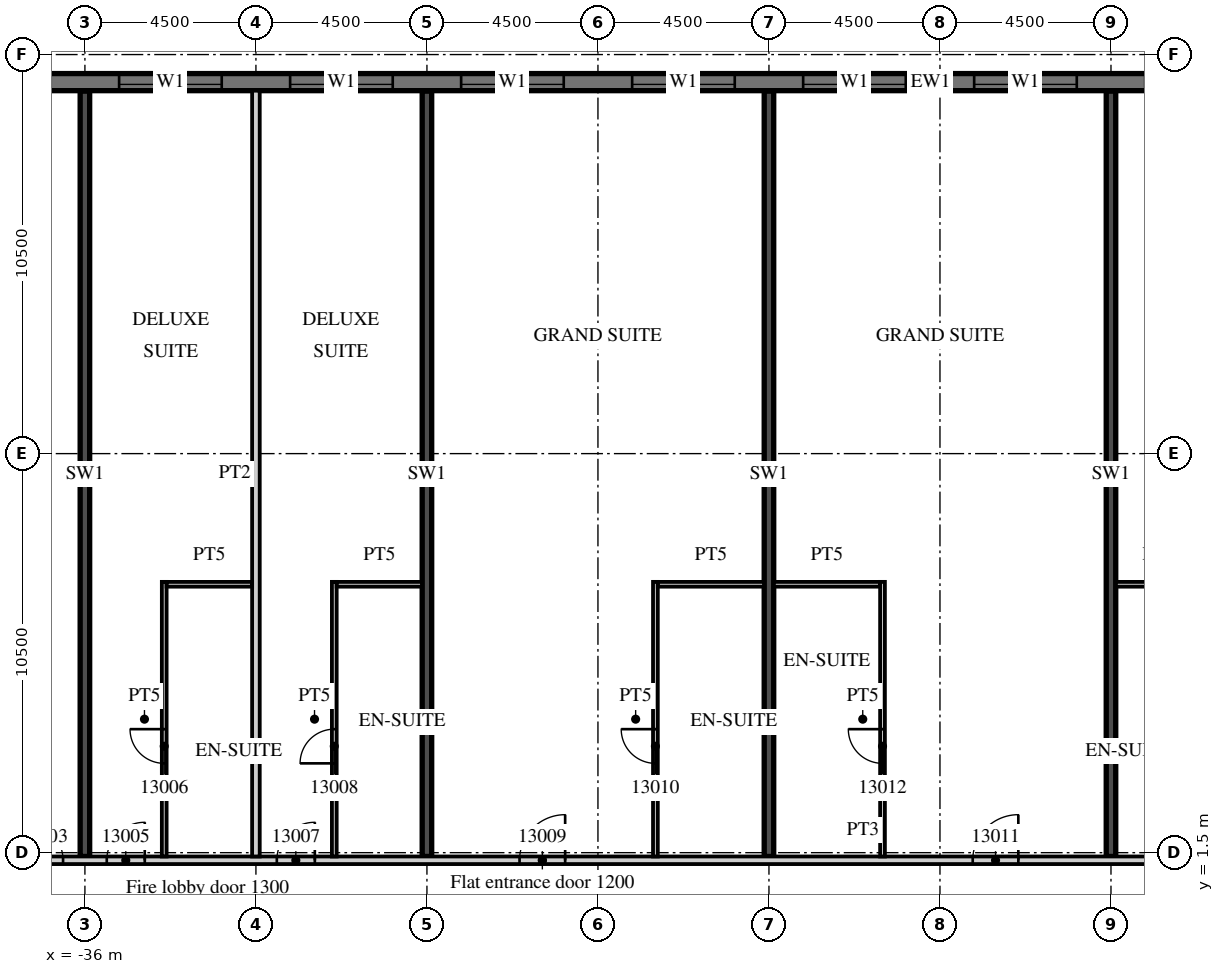
"""IFC4 building model, lengths in metres.
Left out: names, types, materials, properties, quantities, classifications, styles, units other than length and angle.
Written with IfcOpenShell. Run it as: python <this file> out.ifc"""

import sys

from ifc_helpers import new_model, si_unit, direction, frame, frame_2d, origin, place, context, subcontext, project, spatial, rectangle, extrude, element, fill, save


model = new_model("IFC4")
c1 = context("Model", 3, precision=1e-05, world=origin(), true_north=direction((0.0, 1.0)))
c2 = subcontext(c1, "Body", "Model", "MODEL_VIEW")
j1 = project(units=[si_unit("LENGTHUNIT", "METRE"), si_unit("PLANEANGLEUNIT", "RADIAN")], contexts=[c1])
p1 = place(None, origin())
s1 = spatial("IfcSite", under=j1, at=p1, CompositionType="ELEMENT")
p2 = place(p1, origin())
s2 = spatial("IfcBuilding", under=s1, at=p2, CompositionType="ELEMENT")
p3 = place(p2, frame((0.0, 0.0, 73.2)))
s3 = spatial("IfcBuildingStorey", under=s2, at=p3, CompositionType="ELEMENT", Elevation=73.2)
for number, where, z_axis, x_axis in (
    (1, (-36.0, 1.4, 0.0), (0.0, 0.0, 1.0), (0.0, 1.0, 0.0)),
    (2, (-27.0, 1.4, 0.0), (0.0, 0.0, 1.0), (0.0, 1.0, 0.0)),
    (3, (-18.0, 1.4, 0.0), (0.0, 0.0, 1.0), (0.0, 1.0, 0.0)),
    (4, (-9.0, 1.4, 0.0), (0.0, 0.0, 1.0), (0.0, 1.0, 0.0)),
):
    element("IfcWall", number, at=place(p3, frame(where, z_axis=z_axis, x_axis=x_axis)), inside=s3, PredefinedType="SHEAR", context=c2, shape_type="SweptSolid", body=[
        extrude(rectangle(XDim=20.14, YDim=0.25, at=frame_2d((10.07, 0.0))), origin(), (0.0, 0.0, 1.0), 3.3),
    ])
p4 = place(p3, frame((13.5, 21.775, 0.0), z_axis=(0.0, 0.0, 1.0), x_axis=(-1.0, 0.0, 0.0)))
e5 = element("IfcWall", 5, at=p4, inside=s3, PredefinedType="SOLIDWALL", context=c2, shape_type="SweptSolid", body=[
    extrude(rectangle(XDim=54.5, YDim=0.45, at=frame_2d((27.25, 0.0))), origin(), (0.0, 0.0, 1.0), 3.02),
])
p5 = place(p4, frame((0.9, 0.0, 0.45)))
e6 = element("IfcOpeningElement", 6, at=p5, cuts=e5, PredefinedType="OPENING", context=c2, shape_type="SweptSolid", body=[
    extrude(rectangle(XDim=2.7, YDim=2.25, at=frame_2d((1.35, 1.125))), frame((0.0, 0.235, 0.0), z_axis=(0.0, -1.0, 0.0), x_axis=(1.0, 0.0, 0.0)), (0.0, 0.0, 1.0), 0.47),
])
p6 = place(p4, frame((5.4, 0.0, 0.45)))
e7 = element("IfcOpeningElement", 7, at=p6, cuts=e5, PredefinedType="OPENING", context=c2, shape_type="SweptSolid", body=[
    extrude(rectangle(XDim=2.7, YDim=2.25, at=frame_2d((1.35, 1.125))), frame((0.0, 0.235, 0.0), z_axis=(0.0, -1.0, 0.0), x_axis=(1.0, 0.0, 0.0)), (0.0, 0.0, 1.0), 0.47),
])
p7 = place(p4, frame((9.9, 0.0, 0.45)))
e8 = element("IfcOpeningElement", 8, at=p7, cuts=e5, PredefinedType="OPENING", context=c2, shape_type="SweptSolid", body=[
    extrude(rectangle(XDim=2.7, YDim=2.25, at=frame_2d((1.35, 1.125))), frame((0.0, 0.235, 0.0), z_axis=(0.0, -1.0, 0.0), x_axis=(1.0, 0.0, 0.0)), (0.0, 0.0, 1.0), 0.47),
])
p8 = place(p4, frame((14.4, 0.0, 0.45)))
e9 = element("IfcOpeningElement", 9, at=p8, cuts=e5, PredefinedType="OPENING", context=c2, shape_type="SweptSolid", body=[
    extrude(rectangle(XDim=2.7, YDim=2.25, at=frame_2d((1.35, 1.125))), frame((0.0, 0.235, 0.0), z_axis=(0.0, -1.0, 0.0), x_axis=(1.0, 0.0, 0.0)), (0.0, 0.0, 1.0), 0.47),
])
p9 = place(p4, frame((18.9, 0.0, 0.45)))
e10 = element("IfcOpeningElement", 10, at=p9, cuts=e5, PredefinedType="OPENING", context=c2, shape_type="SweptSolid", body=[
    extrude(rectangle(XDim=2.7, YDim=2.25, at=frame_2d((1.35, 1.125))), frame((0.0, 0.235, 0.0), z_axis=(0.0, -1.0, 0.0), x_axis=(1.0, 0.0, 0.0)), (0.0, 0.0, 1.0), 0.47),
])
p10 = place(p4, frame((23.4, 0.0, 0.45)))
e11 = element("IfcOpeningElement", 11, at=p10, cuts=e5, PredefinedType="OPENING", context=c2, shape_type="SweptSolid", body=[
    extrude(rectangle(XDim=2.7, YDim=2.25, at=frame_2d((1.35, 1.125))), frame((0.0, 0.235, 0.0), z_axis=(0.0, -1.0, 0.0), x_axis=(1.0, 0.0, 0.0)), (0.0, 0.0, 1.0), 0.47),
])
p11 = place(p4, frame((27.9, 0.0, 0.45)))
e12 = element("IfcOpeningElement", 12, at=p11, cuts=e5, PredefinedType="OPENING", context=c2, shape_type="SweptSolid", body=[
    extrude(rectangle(XDim=2.7, YDim=2.25, at=frame_2d((1.35, 1.125))), frame((0.0, 0.235, 0.0), z_axis=(0.0, -1.0, 0.0), x_axis=(1.0, 0.0, 0.0)), (0.0, 0.0, 1.0), 0.47),
])
p12 = place(p4, frame((32.4, 0.0, 0.45)))
e13 = element("IfcOpeningElement", 13, at=p12, cuts=e5, PredefinedType="OPENING", context=c2, shape_type="SweptSolid", body=[
    extrude(rectangle(XDim=2.7, YDim=2.25, at=frame_2d((1.35, 1.125))), frame((0.0, 0.235, 0.0), z_axis=(0.0, -1.0, 0.0), x_axis=(1.0, 0.0, 0.0)), (0.0, 0.0, 1.0), 0.47),
])
p13 = place(p4, frame((36.9, 0.0, 0.45)))
e14 = element("IfcOpeningElement", 14, at=p13, cuts=e5, PredefinedType="OPENING", context=c2, shape_type="SweptSolid", body=[
    extrude(rectangle(XDim=2.7, YDim=2.25, at=frame_2d((1.35, 1.125))), frame((0.0, 0.235, 0.0), z_axis=(0.0, -1.0, 0.0), x_axis=(1.0, 0.0, 0.0)), (0.0, 0.0, 1.0), 0.47),
])
p14 = place(p4, frame((41.4, 0.0, 0.45)))
e15 = element("IfcOpeningElement", 15, at=p14, cuts=e5, PredefinedType="OPENING", context=c2, shape_type="SweptSolid", body=[
    extrude(rectangle(XDim=2.7, YDim=2.25, at=frame_2d((1.35, 1.125))), frame((0.0, 0.235, 0.0), z_axis=(0.0, -1.0, 0.0), x_axis=(1.0, 0.0, 0.0)), (0.0, 0.0, 1.0), 0.47),
])
p15 = place(p4, frame((45.9, 0.0, 0.45)))
e16 = element("IfcOpeningElement", 16, at=p15, cuts=e5, PredefinedType="OPENING", context=c2, shape_type="SweptSolid", body=[
    extrude(rectangle(XDim=2.7, YDim=2.25, at=frame_2d((1.35, 1.125))), frame((0.0, 0.235, 0.0), z_axis=(0.0, -1.0, 0.0), x_axis=(1.0, 0.0, 0.0)), (0.0, 0.0, 1.0), 0.47),
])
p16 = place(p4, frame((50.4, 0.0, 0.45)))
e17 = element("IfcOpeningElement", 17, at=p16, cuts=e5, PredefinedType="OPENING", context=c2, shape_type="SweptSolid", body=[
    extrude(rectangle(XDim=2.7, YDim=2.25, at=frame_2d((1.35, 1.125))), frame((0.0, 0.235, 0.0), z_axis=(0.0, -1.0, 0.0), x_axis=(1.0, 0.0, 0.0)), (0.0, 0.0, 1.0), 0.47),
])
p17 = place(p3, frame((-44.55, 1.3, 0.0), z_axis=(0.0, 0.0, 1.0), x_axis=(1.0, 0.0, 0.0)))
e18 = element("IfcWall", 18, at=p17, inside=s3, PredefinedType="PARTITIONING", context=c2, shape_type="SweptSolid", body=[
    extrude(rectangle(XDim=58.05, YDim=0.2, at=frame_2d((29.025, 0.0))), origin(), (0.0, 0.0, 1.0), 3.02),
])
p18 = place(p17, frame((0.525, 0.0, 0.0)))
e19 = element("IfcOpeningElement", 19, at=p18, cuts=e18, PredefinedType="OPENING", context=c2, shape_type="SweptSolid", body=[
    extrude(rectangle(XDim=1.0, YDim=2.1, at=frame_2d((0.5, 1.05))), frame((0.0, 0.11, 0.0), z_axis=(0.0, -1.0, 0.0), x_axis=(1.0, 0.0, 0.0)), (0.0, 0.0, 1.0), 0.22),
])
p19 = place(p17, frame((6.975, 0.0, 0.0)))
e20 = element("IfcOpeningElement", 20, at=p19, cuts=e18, PredefinedType="OPENING", context=c2, shape_type="SweptSolid", body=[
    extrude(rectangle(XDim=1.0, YDim=2.1, at=frame_2d((0.5, 1.05))), frame((0.0, 0.11, 0.0), z_axis=(0.0, -1.0, 0.0), x_axis=(1.0, 0.0, 0.0)), (0.0, 0.0, 1.0), 0.22),
])
p20 = place(p17, frame((9.125, 0.0, 0.0)))
e21 = element("IfcOpeningElement", 21, at=p20, cuts=e18, PredefinedType="OPENING", context=c2, shape_type="SweptSolid", body=[
    extrude(rectangle(XDim=1.0, YDim=2.1, at=frame_2d((0.5, 1.05))), frame((0.0, 0.11, 0.0), z_axis=(0.0, -1.0, 0.0), x_axis=(1.0, 0.0, 0.0)), (0.0, 0.0, 1.0), 0.22),
])
p21 = place(p17, frame((13.6, 0.0, 0.0)))
e22 = element("IfcOpeningElement", 22, at=p21, cuts=e18, PredefinedType="OPENING", context=c2, shape_type="SweptSolid", body=[
    extrude(rectangle(XDim=1.0, YDim=2.1, at=frame_2d((0.5, 1.05))), frame((0.0, 0.11, 0.0), z_axis=(0.0, -1.0, 0.0), x_axis=(1.0, 0.0, 0.0)), (0.0, 0.0, 1.0), 0.22),
])
p22 = place(p17, frame((19.987, 0.0, 0.0)))
e23 = element("IfcOpeningElement", 23, at=p22, cuts=e18, PredefinedType="OPENING", context=c2, shape_type="SweptSolid", body=[
    extrude(rectangle(XDim=1.2, YDim=2.1, at=frame_2d((0.6, 1.05))), frame((0.0, 0.11, 0.0), z_axis=(0.0, -1.0, 0.0), x_axis=(1.0, 0.0, 0.0)), (0.0, 0.0, 1.0), 0.22),
])
p23 = place(p17, frame((31.912, 0.0, 0.0)))
e24 = element("IfcOpeningElement", 24, at=p23, cuts=e18, PredefinedType="OPENING", context=c2, shape_type="SweptSolid", body=[
    extrude(rectangle(XDim=1.2, YDim=2.1, at=frame_2d((0.6, 1.05))), frame((0.0, 0.11, 0.0), z_axis=(0.0, -1.0, 0.0), x_axis=(1.0, 0.0, 0.0)), (0.0, 0.0, 1.0), 0.22),
])
p24 = place(p17, frame((38.5, 0.0, 0.0)))
e25 = element("IfcOpeningElement", 25, at=p24, cuts=e18, PredefinedType="OPENING", context=c2, shape_type="SweptSolid", body=[
    extrude(rectangle(XDim=1.0, YDim=2.1, at=frame_2d((0.5, 1.05))), frame((0.0, 0.11, 0.0), z_axis=(0.0, -1.0, 0.0), x_axis=(1.0, 0.0, 0.0)), (0.0, 0.0, 1.0), 0.22),
])
p25 = place(p17, frame((40.6, 0.0, 0.0)))
e26 = element("IfcOpeningElement", 26, at=p25, cuts=e18, PredefinedType="OPENING", context=c2, shape_type="SweptSolid", body=[
    extrude(rectangle(XDim=1.0, YDim=2.1, at=frame_2d((0.5, 1.05))), frame((0.0, 0.11, 0.0), z_axis=(0.0, -1.0, 0.0), x_axis=(1.0, 0.0, 0.0)), (0.0, 0.0, 1.0), 0.22),
])
p26 = place(p17, frame((47.5, 0.0, 0.0)))
e27 = element("IfcOpeningElement", 27, at=p26, cuts=e18, PredefinedType="OPENING", context=c2, shape_type="SweptSolid", body=[
    extrude(rectangle(XDim=1.0, YDim=2.1, at=frame_2d((0.5, 1.05))), frame((0.0, 0.11, 0.0), z_axis=(0.0, -1.0, 0.0), x_axis=(1.0, 0.0, 0.0)), (0.0, 0.0, 1.0), 0.22),
])
p27 = place(p17, frame((51.975, 0.0, 0.0)))
e28 = element("IfcOpeningElement", 28, at=p27, cuts=e18, PredefinedType="OPENING", context=c2, shape_type="SweptSolid", body=[
    extrude(rectangle(XDim=1.0, YDim=2.1, at=frame_2d((0.5, 1.05))), frame((0.0, 0.11, 0.0), z_axis=(0.0, -1.0, 0.0), x_axis=(1.0, 0.0, 0.0)), (0.0, 0.0, 1.0), 0.22),
])
p28 = place(p17, frame((56.475, 0.0, 0.0)))
e29 = element("IfcOpeningElement", 29, at=p28, cuts=e18, PredefinedType="OPENING", context=c2, shape_type="SweptSolid", body=[
    extrude(rectangle(XDim=1.0, YDim=2.1, at=frame_2d((0.5, 1.05))), frame((0.0, 0.11, 0.0), z_axis=(0.0, -1.0, 0.0), x_axis=(1.0, 0.0, 0.0)), (0.0, 0.0, 1.0), 0.22),
])
p29 = place(p3, frame((-31.5, 1.4, 0.0), z_axis=(0.0, 0.0, 1.0), x_axis=(0.0, 1.0, 0.0)))
e30 = element("IfcWall", 30, at=p29, inside=s3, PredefinedType="PARTITIONING", context=c2, shape_type="SweptSolid", body=[
    extrude(rectangle(XDim=20.15, YDim=0.2, at=frame_2d((10.075, 0.0))), origin(), (0.0, 0.0, 1.0), 3.02),
])
p30 = place(p3, frame((-33.913, 1.4, 0.0), z_axis=(0.0, 0.0, 1.0), x_axis=(0.0, 1.0, 0.0)))
e31 = element("IfcWall", 31, at=p30, inside=s3, PredefinedType="PARTITIONING", context=c2, shape_type="SweptSolid", body=[
    extrude(rectangle(XDim=7.225, YDim=0.125, at=frame_2d((3.613, 0.0))), origin(), (0.0, 0.0, 1.0), 3.02),
])
p31 = place(p30, frame((2.45, 0.0, 0.0)))
e32 = element("IfcOpeningElement", 32, at=p31, cuts=e31, PredefinedType="OPENING", context=c2, shape_type="SweptSolid", body=[
    extrude(rectangle(XDim=0.9, YDim=2.1, at=frame_2d((0.45, 1.05))), frame((0.0, 0.073, 0.0), z_axis=(0.0, -1.0, 0.0), x_axis=(1.0, 0.0, 0.0)), (0.0, 0.0, 1.0), 0.145),
])
p32 = place(p3, frame((-33.85, 8.562, 0.0), z_axis=(0.0, 0.0, 1.0), x_axis=(1.0, 0.0, 0.0)))
e33 = element("IfcWall", 33, at=p32, inside=s3, PredefinedType="PARTITIONING", context=c2, shape_type="SweptSolid", body=[
    extrude(rectangle(XDim=2.25, YDim=0.125, at=frame_2d((1.125, 0.0))), origin(), (0.0, 0.0, 1.0), 3.02),
])
p33 = place(p3, frame((-29.438, 1.4, 0.0), z_axis=(0.0, 0.0, 1.0), x_axis=(0.0, 1.0, 0.0)))
e34 = element("IfcWall", 34, at=p33, inside=s3, PredefinedType="PARTITIONING", context=c2, shape_type="SweptSolid", body=[
    extrude(rectangle(XDim=7.225, YDim=0.125, at=frame_2d((3.613, 0.0))), origin(), (0.0, 0.0, 1.0), 3.02),
])
p34 = place(p33, frame((2.45, 0.0, 0.0)))
e35 = element("IfcOpeningElement", 35, at=p34, cuts=e34, PredefinedType="OPENING", context=c2, shape_type="SweptSolid", body=[
    extrude(rectangle(XDim=0.9, YDim=2.1, at=frame_2d((0.45, 1.05))), frame((0.0, 0.073, 0.0), z_axis=(0.0, -1.0, 0.0), x_axis=(1.0, 0.0, 0.0)), (0.0, 0.0, 1.0), 0.145),
])
p35 = place(p3, frame((-29.375, 8.562, 0.0), z_axis=(0.0, 0.0, 1.0), x_axis=(1.0, 0.0, 0.0)))
e36 = element("IfcWall", 36, at=p35, inside=s3, PredefinedType="PARTITIONING", context=c2, shape_type="SweptSolid", body=[
    extrude(rectangle(XDim=2.25, YDim=0.125, at=frame_2d((1.125, 0.0))), origin(), (0.0, 0.0, 1.0), 3.02),
])
p36 = place(p3, frame((-20.988, 1.4, 0.0), z_axis=(0.0, 0.0, 1.0), x_axis=(0.0, 1.0, 0.0)))
e37 = element("IfcWall", 37, at=p36, inside=s3, PredefinedType="PARTITIONING", context=c2, shape_type="SweptSolid", body=[
    extrude(rectangle(XDim=7.225, YDim=0.125, at=frame_2d((3.613, 0.0))), origin(), (0.0, 0.0, 1.0), 3.02),
])
p37 = place(p36, frame((2.45, 0.0, 0.0)))
e38 = element("IfcOpeningElement", 38, at=p37, cuts=e37, PredefinedType="OPENING", context=c2, shape_type="SweptSolid", body=[
    extrude(rectangle(XDim=0.9, YDim=2.1, at=frame_2d((0.45, 1.05))), frame((0.0, 0.073, 0.0), z_axis=(0.0, -1.0, 0.0), x_axis=(1.0, 0.0, 0.0)), (0.0, 0.0, 1.0), 0.145),
])
p38 = place(p3, frame((-20.925, 8.562, 0.0), z_axis=(0.0, 0.0, 1.0), x_axis=(1.0, 0.0, 0.0)))
e39 = element("IfcWall", 39, at=p38, inside=s3, PredefinedType="PARTITIONING", context=c2, shape_type="SweptSolid", body=[
    extrude(rectangle(XDim=2.8, YDim=0.125, at=frame_2d((1.4, 0.0))), origin(), (0.0, 0.0, 1.0), 3.02),
])
p39 = place(p3, frame((-15.012, 1.4, 0.0), z_axis=(0.0, 0.0, 1.0), x_axis=(0.0, 1.0, 0.0)))
e40 = element("IfcWall", 40, at=p39, inside=s3, PredefinedType="PARTITIONING", context=c2, shape_type="SweptSolid", body=[
    extrude(rectangle(XDim=7.225, YDim=0.125, at=frame_2d((3.613, 0.0))), origin(), (0.0, 0.0, 1.0), 3.02),
])
p40 = place(p39, frame((2.45, 0.0, 0.0)))
e41 = element("IfcOpeningElement", 41, at=p40, cuts=e40, PredefinedType="OPENING", context=c2, shape_type="SweptSolid", body=[
    extrude(rectangle(XDim=0.9, YDim=2.1, at=frame_2d((0.45, 1.05))), frame((0.0, 0.073, 0.0), z_axis=(0.0, -1.0, 0.0), x_axis=(1.0, 0.0, 0.0)), (0.0, 0.0, 1.0), 0.145),
])
p41 = place(p3, frame((-17.875, 8.562, 0.0), z_axis=(0.0, 0.0, 1.0), x_axis=(1.0, 0.0, 0.0)))
e42 = element("IfcWall", 42, at=p41, inside=s3, PredefinedType="PARTITIONING", context=c2, shape_type="SweptSolid", body=[
    extrude(rectangle(XDim=2.8, YDim=0.125, at=frame_2d((1.4, 0.0))), origin(), (0.0, 0.0, 1.0), 3.02),
])
p42 = place(p3, frame((-8.875, 8.562, 0.0), z_axis=(0.0, 0.0, 1.0), x_axis=(1.0, 0.0, 0.0)))
e43 = element("IfcWall", 43, at=p42, inside=s3, PredefinedType="PARTITIONING", context=c2, shape_type="SweptSolid", body=[
    extrude(rectangle(XDim=2.25, YDim=0.125, at=frame_2d((1.125, 0.0))), origin(), (0.0, 0.0, 1.0), 3.02),
])
p43 = place(p10, origin())
e44 = element("IfcWindow", 44, at=p43, inside=s3, PartitioningType="SINGLE_PANEL", PredefinedType="WINDOW", context=c2, shape_type="SweptSolid", body=[
    extrude(rectangle(XDim=2.7, YDim=2.25, at=frame_2d((1.35, 1.125))), frame((0.0, 0.09, 0.0), z_axis=(0.0, -1.0, 0.0), x_axis=(1.0, 0.0, 0.0)), (0.0, 0.0, 1.0), 0.06),
])
fill(e11, e44)
p44 = place(p11, origin())
e45 = element("IfcWindow", 45, at=p44, inside=s3, PartitioningType="SINGLE_PANEL", PredefinedType="WINDOW", context=c2, shape_type="SweptSolid", body=[
    extrude(rectangle(XDim=2.7, YDim=2.25, at=frame_2d((1.35, 1.125))), frame((0.0, 0.09, 0.0), z_axis=(0.0, -1.0, 0.0), x_axis=(1.0, 0.0, 0.0)), (0.0, 0.0, 1.0), 0.06),
])
fill(e12, e45)
p45 = place(p12, origin())
e46 = element("IfcWindow", 46, at=p45, inside=s3, PartitioningType="SINGLE_PANEL", PredefinedType="WINDOW", context=c2, shape_type="SweptSolid", body=[
    extrude(rectangle(XDim=2.7, YDim=2.25, at=frame_2d((1.35, 1.125))), frame((0.0, 0.09, 0.0), z_axis=(0.0, -1.0, 0.0), x_axis=(1.0, 0.0, 0.0)), (0.0, 0.0, 1.0), 0.06),
])
fill(e13, e46)
p46 = place(p13, origin())
e47 = element("IfcWindow", 47, at=p46, inside=s3, PartitioningType="SINGLE_PANEL", PredefinedType="WINDOW", context=c2, shape_type="SweptSolid", body=[
    extrude(rectangle(XDim=2.7, YDim=2.25, at=frame_2d((1.35, 1.125))), frame((0.0, 0.09, 0.0), z_axis=(0.0, -1.0, 0.0), x_axis=(1.0, 0.0, 0.0)), (0.0, 0.0, 1.0), 0.06),
])
fill(e14, e47)
p47 = place(p14, origin())
e48 = element("IfcWindow", 48, at=p47, inside=s3, PartitioningType="SINGLE_PANEL", PredefinedType="WINDOW", context=c2, shape_type="SweptSolid", body=[
    extrude(rectangle(XDim=2.7, YDim=2.25, at=frame_2d((1.35, 1.125))), frame((0.0, 0.09, 0.0), z_axis=(0.0, -1.0, 0.0), x_axis=(1.0, 0.0, 0.0)), (0.0, 0.0, 1.0), 0.06),
])
fill(e15, e48)
p48 = place(p15, origin())
e49 = element("IfcWindow", 49, at=p48, inside=s3, PartitioningType="SINGLE_PANEL", PredefinedType="WINDOW", context=c2, shape_type="SweptSolid", body=[
    extrude(rectangle(XDim=2.7, YDim=2.25, at=frame_2d((1.35, 1.125))), frame((0.0, 0.09, 0.0), z_axis=(0.0, -1.0, 0.0), x_axis=(1.0, 0.0, 0.0)), (0.0, 0.0, 1.0), 0.06),
])
fill(e16, e49)
p49 = place(p19, origin())
e50 = element("IfcDoor", 50, at=p49, inside=s3, OperationType="SINGLE_SWING_LEFT", PredefinedType="DOOR", context=c2, shape_type="SweptSolid", body=[
    extrude(rectangle(XDim=1.0, YDim=2.1, at=frame_2d((0.5, 1.05))), frame((0.0, 0.025, 0.0), z_axis=(0.0, -1.0, 0.0), x_axis=(1.0, 0.0, 0.0)), (0.0, 0.0, 1.0), 0.05),
])
fill(e20, e50)
p50 = place(p20, origin())
e51 = element("IfcDoor", 51, at=p50, inside=s3, OperationType="SINGLE_SWING_RIGHT", PredefinedType="DOOR", context=c2, shape_type="SweptSolid", body=[
    extrude(rectangle(XDim=1.0, YDim=2.1, at=frame_2d((0.5, 1.05))), frame((0.0, 0.025, 0.0), z_axis=(0.0, -1.0, 0.0), x_axis=(1.0, 0.0, 0.0)), (0.0, 0.0, 1.0), 0.05),
])
fill(e21, e51)
p51 = place(p31, origin())
e52 = element("IfcDoor", 52, at=p51, inside=s3, OperationType="SINGLE_SWING_RIGHT", PredefinedType="DOOR", context=c2, shape_type="SweptSolid", body=[
    extrude(rectangle(XDim=0.9, YDim=2.1, at=frame_2d((0.45, 1.05))), frame((0.0, 0.025, 0.0), z_axis=(0.0, -1.0, 0.0), x_axis=(1.0, 0.0, 0.0)), (0.0, 0.0, 1.0), 0.05),
])
fill(e32, e52)
p52 = place(p21, origin())
e53 = element("IfcDoor", 53, at=p52, inside=s3, OperationType="SINGLE_SWING_RIGHT", PredefinedType="DOOR", context=c2, shape_type="SweptSolid", body=[
    extrude(rectangle(XDim=1.0, YDim=2.1, at=frame_2d((0.5, 1.05))), frame((0.0, 0.025, 0.0), z_axis=(0.0, -1.0, 0.0), x_axis=(1.0, 0.0, 0.0)), (0.0, 0.0, 1.0), 0.05),
])
fill(e22, e53)
p53 = place(p34, origin())
e54 = element("IfcDoor", 54, at=p53, inside=s3, OperationType="SINGLE_SWING_LEFT", PredefinedType="DOOR", context=c2, shape_type="SweptSolid", body=[
    extrude(rectangle(XDim=0.9, YDim=2.1, at=frame_2d((0.45, 1.05))), frame((0.0, 0.025, 0.0), z_axis=(0.0, -1.0, 0.0), x_axis=(1.0, 0.0, 0.0)), (0.0, 0.0, 1.0), 0.05),
])
fill(e35, e54)
p54 = place(p22, origin())
e55 = element("IfcDoor", 55, at=p54, inside=s3, OperationType="SINGLE_SWING_RIGHT", PredefinedType="DOOR", context=c2, shape_type="SweptSolid", body=[
    extrude(rectangle(XDim=1.2, YDim=2.1, at=frame_2d((0.6, 1.05))), frame((0.0, 0.025, 0.0), z_axis=(0.0, -1.0, 0.0), x_axis=(1.0, 0.0, 0.0)), (0.0, 0.0, 1.0), 0.05),
])
fill(e23, e55)
p55 = place(p37, origin())
e56 = element("IfcDoor", 56, at=p55, inside=s3, OperationType="SINGLE_SWING_RIGHT", PredefinedType="DOOR", context=c2, shape_type="SweptSolid", body=[
    extrude(rectangle(XDim=0.9, YDim=2.1, at=frame_2d((0.45, 1.05))), frame((0.0, 0.025, 0.0), z_axis=(0.0, -1.0, 0.0), x_axis=(1.0, 0.0, 0.0)), (0.0, 0.0, 1.0), 0.05),
])
fill(e38, e56)
p56 = place(p23, origin())
e57 = element("IfcDoor", 57, at=p56, inside=s3, OperationType="SINGLE_SWING_RIGHT", PredefinedType="DOOR", context=c2, shape_type="SweptSolid", body=[
    extrude(rectangle(XDim=1.2, YDim=2.1, at=frame_2d((0.6, 1.05))), frame((0.0, 0.025, 0.0), z_axis=(0.0, -1.0, 0.0), x_axis=(1.0, 0.0, 0.0)), (0.0, 0.0, 1.0), 0.05),
])
fill(e24, e57)
p57 = place(p40, origin())
e58 = element("IfcDoor", 58, at=p57, inside=s3, OperationType="SINGLE_SWING_RIGHT", PredefinedType="DOOR", context=c2, shape_type="SweptSolid", body=[
    extrude(rectangle(XDim=0.9, YDim=2.1, at=frame_2d((0.45, 1.05))), frame((0.0, 0.025, 0.0), z_axis=(0.0, -1.0, 0.0), x_axis=(1.0, 0.0, 0.0)), (0.0, 0.0, 1.0), 0.05),
])
fill(e41, e58)
save(model, sys.argv[1])
